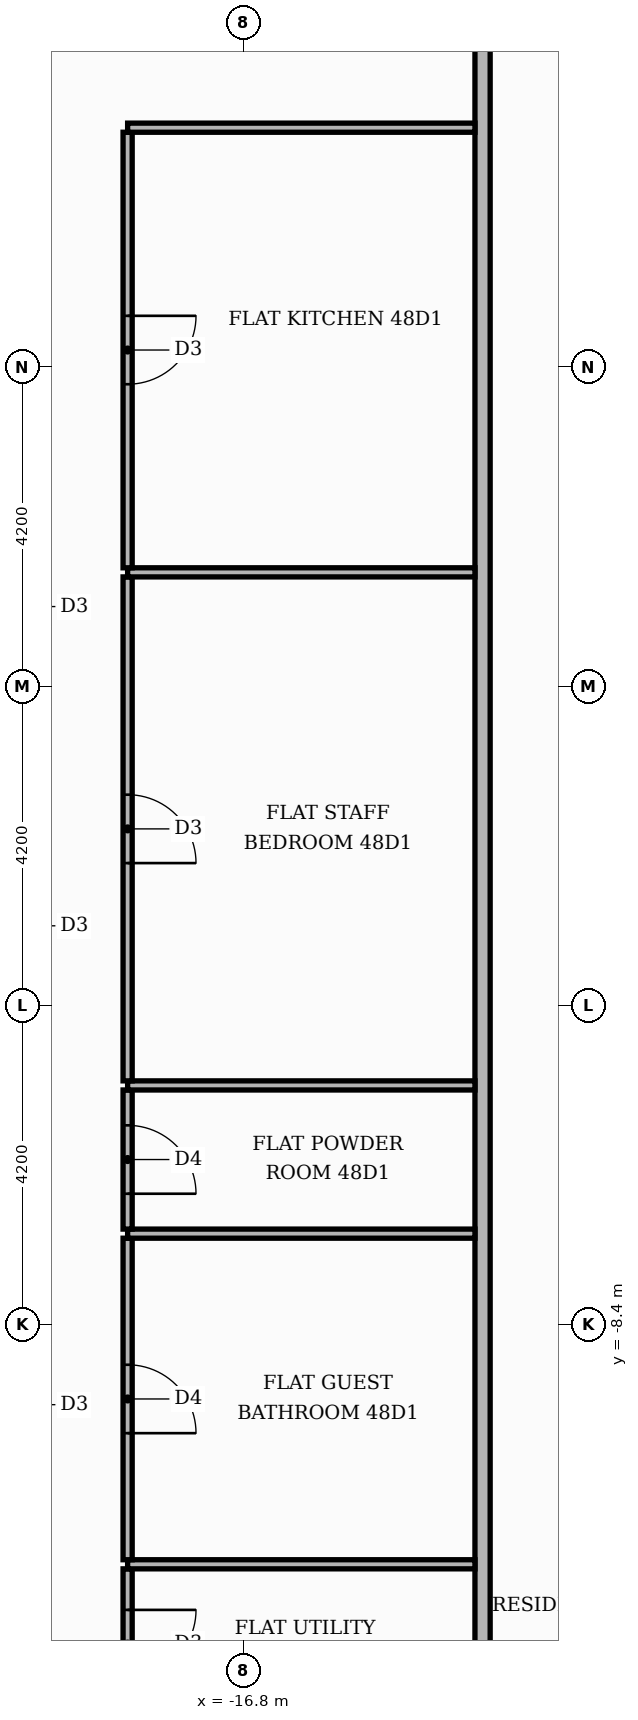
"""IFC4 building model, lengths in metres.
Left out: names, types, materials, properties, quantities, classifications, styles, units other than length and angle.
Written with IfcOpenShell. Run it as: python <this file> out.ifc"""

import sys

from ifc_helpers import new_model, si_unit, direction, frame, frame_2d, origin, place, context, subcontext, project, spatial, rectangle, extrude, element, fill, save


model = new_model("IFC4")
c1 = context("Model", 3, precision=1e-05, world=origin(), true_north=direction((0.0, 1.0)))
c2 = subcontext(c1, "Body", "Model", "MODEL_VIEW")
j1 = project(units=[si_unit("LENGTHUNIT", "METRE"), si_unit("PLANEANGLEUNIT", "RADIAN")], contexts=[c1])
p1 = place(None, origin())
s1 = spatial("IfcSite", under=j1, at=p1, CompositionType="ELEMENT")
p2 = place(p1, origin())
s2 = spatial("IfcBuilding", under=s1, at=p2, CompositionType="ELEMENT")
p3 = place(p2, frame((0.0, 0.0, 204.0)))
s3 = spatial("IfcBuildingStorey", under=s2, at=p3, CompositionType="ELEMENT", Elevation=204.0)
p4 = place(p3, frame((-18.32, -13.55, 0.0), z_axis=(0.0, 0.0, 1.0), x_axis=(0.0, 1.0, 0.0)))
e1 = element("IfcWall", 1, at=p4, inside=s3, PredefinedType="PARTITIONING", context=c2, shape_type="SweptSolid", body=[
    extrude(rectangle(XDim=1.94, YDim=0.12, at=frame_2d((0.97, 0.0))), origin(), (0.0, 0.0, 1.0), 3.48),
])
p5 = place(p4, frame((0.5, 0.0, 0.0)))
e2 = element("IfcOpeningElement", 2, at=p5, cuts=e1, PredefinedType="OPENING", context=c2, shape_type="SweptSolid", body=[
    extrude(rectangle(XDim=0.9, YDim=2.1, at=frame_2d((0.45, 1.05))), frame((0.0, 0.07, 0.0), z_axis=(0.0, -1.0, 0.0), x_axis=(1.0, 0.0, 0.0)), (0.0, 0.0, 1.0), 0.14),
])
p6 = place(p3, frame((-13.65, -13.55, 0.0), z_axis=(0.0, 0.0, 1.0), x_axis=(0.0, 1.0, 0.0)))
e3 = element("IfcWall", 3, at=p6, inside=s3, PredefinedType="PARTITIONING", context=c2, shape_type="SweptSolid", body=[
    extrude(rectangle(XDim=27.1, YDim=0.2, at=frame_2d((13.55, 0.0))), origin(), (0.0, 0.0, 1.0), 3.48),
])
p7 = place(p6, frame((23.5, 0.0, 0.0)))
e4 = element("IfcOpeningElement", 4, at=p7, cuts=e3, PredefinedType="OPENING", context=c2, shape_type="SweptSolid", body=[
    extrude(rectangle(XDim=1.1, YDim=2.4, at=frame_2d((0.55, 1.2))), frame((0.0, 0.11, 0.0), z_axis=(0.0, -1.0, 0.0), x_axis=(1.0, 0.0, 0.0)), (0.0, 0.0, 1.0), 0.22),
])
p8 = place(p3, frame((-18.32, -11.55, 0.0), z_axis=(0.0, 0.0, 1.0), x_axis=(1.0, 0.0, 0.0)))
e5 = element("IfcWall", 5, at=p8, inside=s3, PredefinedType="PARTITIONING", context=c2, shape_type="SweptSolid", body=[
    extrude(rectangle(XDim=4.57, YDim=0.12, at=frame_2d((2.285, 0.0))), origin(), (0.0, 0.0, 1.0), 3.48),
])
p9 = place(p3, frame((-18.32, -11.49, 0.0), z_axis=(0.0, 0.0, 1.0), x_axis=(0.0, 1.0, 0.0)))
e6 = element("IfcWall", 6, at=p9, inside=s3, PredefinedType="PARTITIONING", context=c2, shape_type="SweptSolid", body=[
    extrude(rectangle(XDim=4.23, YDim=0.12, at=frame_2d((2.115, 0.0))), origin(), (0.0, 0.0, 1.0), 3.48),
])
p10 = place(p9, frame((1.665, 0.0, 0.0)))
e7 = element("IfcOpeningElement", 7, at=p10, cuts=e6, PredefinedType="OPENING", context=c2, shape_type="SweptSolid", body=[
    extrude(rectangle(XDim=0.9, YDim=2.1, at=frame_2d((0.45, 1.05))), frame((0.0, 0.07, 0.0), z_axis=(0.0, -1.0, 0.0), x_axis=(1.0, 0.0, 0.0)), (0.0, 0.0, 1.0), 0.14),
])
p11 = place(p3, frame((-18.32, -7.2, 0.0), z_axis=(0.0, 0.0, 1.0), x_axis=(1.0, 0.0, 0.0)))
e8 = element("IfcWall", 8, at=p11, inside=s3, PredefinedType="PARTITIONING", context=c2, shape_type="SweptSolid", body=[
    extrude(rectangle(XDim=4.57, YDim=0.12, at=frame_2d((2.285, 0.0))), origin(), (0.0, 0.0, 1.0), 3.48),
])
p12 = place(p3, frame((-18.32, -7.14, 0.0), z_axis=(0.0, 0.0, 1.0), x_axis=(0.0, 1.0, 0.0)))
e9 = element("IfcWall", 9, at=p12, inside=s3, PredefinedType="PARTITIONING", context=c2, shape_type="SweptSolid", body=[
    extrude(rectangle(XDim=1.83, YDim=0.12, at=frame_2d((0.915, 0.0))), origin(), (0.0, 0.0, 1.0), 3.48),
])
p13 = place(p12, frame((0.465, 0.0, 0.0)))
e10 = element("IfcOpeningElement", 10, at=p13, cuts=e9, PredefinedType="OPENING", context=c2, shape_type="SweptSolid", body=[
    extrude(rectangle(XDim=0.9, YDim=2.1, at=frame_2d((0.45, 1.05))), frame((0.0, 0.07, 0.0), z_axis=(0.0, -1.0, 0.0), x_axis=(1.0, 0.0, 0.0)), (0.0, 0.0, 1.0), 0.14),
])
p14 = place(p3, frame((-18.32, -5.25, 0.0), z_axis=(0.0, 0.0, 1.0), x_axis=(1.0, 0.0, 0.0)))
e11 = element("IfcWall", 11, at=p14, inside=s3, PredefinedType="PARTITIONING", context=c2, shape_type="SweptSolid", body=[
    extrude(rectangle(XDim=4.57, YDim=0.12, at=frame_2d((2.285, 0.0))), origin(), (0.0, 0.0, 1.0), 3.48),
])
p15 = place(p3, frame((-18.32, -5.19, 0.0), z_axis=(0.0, 0.0, 1.0), x_axis=(0.0, 1.0, 0.0)))
e12 = element("IfcWall", 12, at=p15, inside=s3, PredefinedType="PARTITIONING", context=c2, shape_type="SweptSolid", body=[
    extrude(rectangle(XDim=6.63, YDim=0.12, at=frame_2d((3.315, 0.0))), origin(), (0.0, 0.0, 1.0), 3.48),
])
p16 = place(p15, frame((2.865, 0.0, 0.0)))
e13 = element("IfcOpeningElement", 13, at=p16, cuts=e12, PredefinedType="OPENING", context=c2, shape_type="SweptSolid", body=[
    extrude(rectangle(XDim=0.9, YDim=2.1, at=frame_2d((0.45, 1.05))), frame((0.0, 0.07, 0.0), z_axis=(0.0, -1.0, 0.0), x_axis=(1.0, 0.0, 0.0)), (0.0, 0.0, 1.0), 0.14),
])
p17 = place(p3, frame((-18.32, 1.5, 0.0), z_axis=(0.0, 0.0, 1.0), x_axis=(1.0, 0.0, 0.0)))
e14 = element("IfcWall", 14, at=p17, inside=s3, PredefinedType="PARTITIONING", context=c2, shape_type="SweptSolid", body=[
    extrude(rectangle(XDim=4.57, YDim=0.12, at=frame_2d((2.285, 0.0))), origin(), (0.0, 0.0, 1.0), 3.48),
])
p18 = place(p3, frame((-18.32, 1.56, 0.0), z_axis=(0.0, 0.0, 1.0), x_axis=(0.0, 1.0, 0.0)))
e15 = element("IfcWall", 15, at=p18, inside=s3, PredefinedType="PARTITIONING", context=c2, shape_type="SweptSolid", body=[
    extrude(rectangle(XDim=5.73, YDim=0.12, at=frame_2d((2.865, 0.0))), origin(), (0.0, 0.0, 1.0), 3.48),
])
p19 = place(p18, frame((2.415, 0.0, 0.0)))
e16 = element("IfcOpeningElement", 16, at=p19, cuts=e15, PredefinedType="OPENING", context=c2, shape_type="SweptSolid", body=[
    extrude(rectangle(XDim=0.9, YDim=2.1, at=frame_2d((0.45, 1.05))), frame((0.0, 0.07, 0.0), z_axis=(0.0, -1.0, 0.0), x_axis=(1.0, 0.0, 0.0)), (0.0, 0.0, 1.0), 0.14),
])
p20 = place(p3, frame((-18.32, 7.35, 0.0), z_axis=(0.0, 0.0, 1.0), x_axis=(1.0, 0.0, 0.0)))
e17 = element("IfcWall", 17, at=p20, inside=s3, PredefinedType="PARTITIONING", context=c2, shape_type="SweptSolid", body=[
    extrude(rectangle(XDim=4.57, YDim=0.12, at=frame_2d((2.285, 0.0))), origin(), (0.0, 0.0, 1.0), 3.48),
])
p21 = place(p19, frame((0.9, 0.0, 0.0), z_axis=(0.0, 0.0, 1.0), x_axis=(-1.0, 0.0, 0.0)))
e18 = element("IfcDoor", 18, at=p21, inside=s3, OperationType="SINGLE_SWING_RIGHT", PredefinedType="DOOR", context=c2, shape_type="SweptSolid", body=[
    extrude(rectangle(XDim=0.9, YDim=2.1, at=frame_2d((0.45, 1.05))), frame((0.0, 0.025, 0.0), z_axis=(0.0, -1.0, 0.0), x_axis=(1.0, 0.0, 0.0)), (0.0, 0.0, 1.0), 0.05),
])
fill(e16, e18)
p22 = place(p16, frame((0.9, 0.0, 0.0), z_axis=(0.0, 0.0, 1.0), x_axis=(-1.0, 0.0, 0.0)))
e19 = element("IfcDoor", 19, at=p22, inside=s3, OperationType="SINGLE_SWING_LEFT", PredefinedType="DOOR", context=c2, shape_type="SweptSolid", body=[
    extrude(rectangle(XDim=0.9, YDim=2.1, at=frame_2d((0.45, 1.05))), frame((0.0, 0.025, 0.0), z_axis=(0.0, -1.0, 0.0), x_axis=(1.0, 0.0, 0.0)), (0.0, 0.0, 1.0), 0.05),
])
fill(e13, e19)
p23 = place(p13, frame((0.9, 0.0, 0.0), z_axis=(0.0, 0.0, 1.0), x_axis=(-1.0, 0.0, 0.0)))
e20 = element("IfcDoor", 20, at=p23, inside=s3, OperationType="SINGLE_SWING_LEFT", PredefinedType="DOOR", context=c2, shape_type="SweptSolid", body=[
    extrude(rectangle(XDim=0.9, YDim=2.1, at=frame_2d((0.45, 1.05))), frame((0.0, 0.025, 0.0), z_axis=(0.0, -1.0, 0.0), x_axis=(1.0, 0.0, 0.0)), (0.0, 0.0, 1.0), 0.05),
])
fill(e10, e20)
p24 = place(p10, frame((0.9, 0.0, 0.0), z_axis=(0.0, 0.0, 1.0), x_axis=(-1.0, 0.0, 0.0)))
e21 = element("IfcDoor", 21, at=p24, inside=s3, OperationType="SINGLE_SWING_LEFT", PredefinedType="DOOR", context=c2, shape_type="SweptSolid", body=[
    extrude(rectangle(XDim=0.9, YDim=2.1, at=frame_2d((0.45, 1.05))), frame((0.0, 0.025, 0.0), z_axis=(0.0, -1.0, 0.0), x_axis=(1.0, 0.0, 0.0)), (0.0, 0.0, 1.0), 0.05),
])
fill(e7, e21)
p25 = place(p5, frame((0.9, 0.0, 0.0), z_axis=(0.0, 0.0, 1.0), x_axis=(-1.0, 0.0, 0.0)))
e22 = element("IfcDoor", 22, at=p25, inside=s3, OperationType="SINGLE_SWING_RIGHT", PredefinedType="DOOR", context=c2, shape_type="SweptSolid", body=[
    extrude(rectangle(XDim=0.9, YDim=2.1, at=frame_2d((0.45, 1.05))), frame((0.0, 0.025, 0.0), z_axis=(0.0, -1.0, 0.0), x_axis=(1.0, 0.0, 0.0)), (0.0, 0.0, 1.0), 0.05),
])
fill(e2, e22)
save(model, sys.argv[1])
